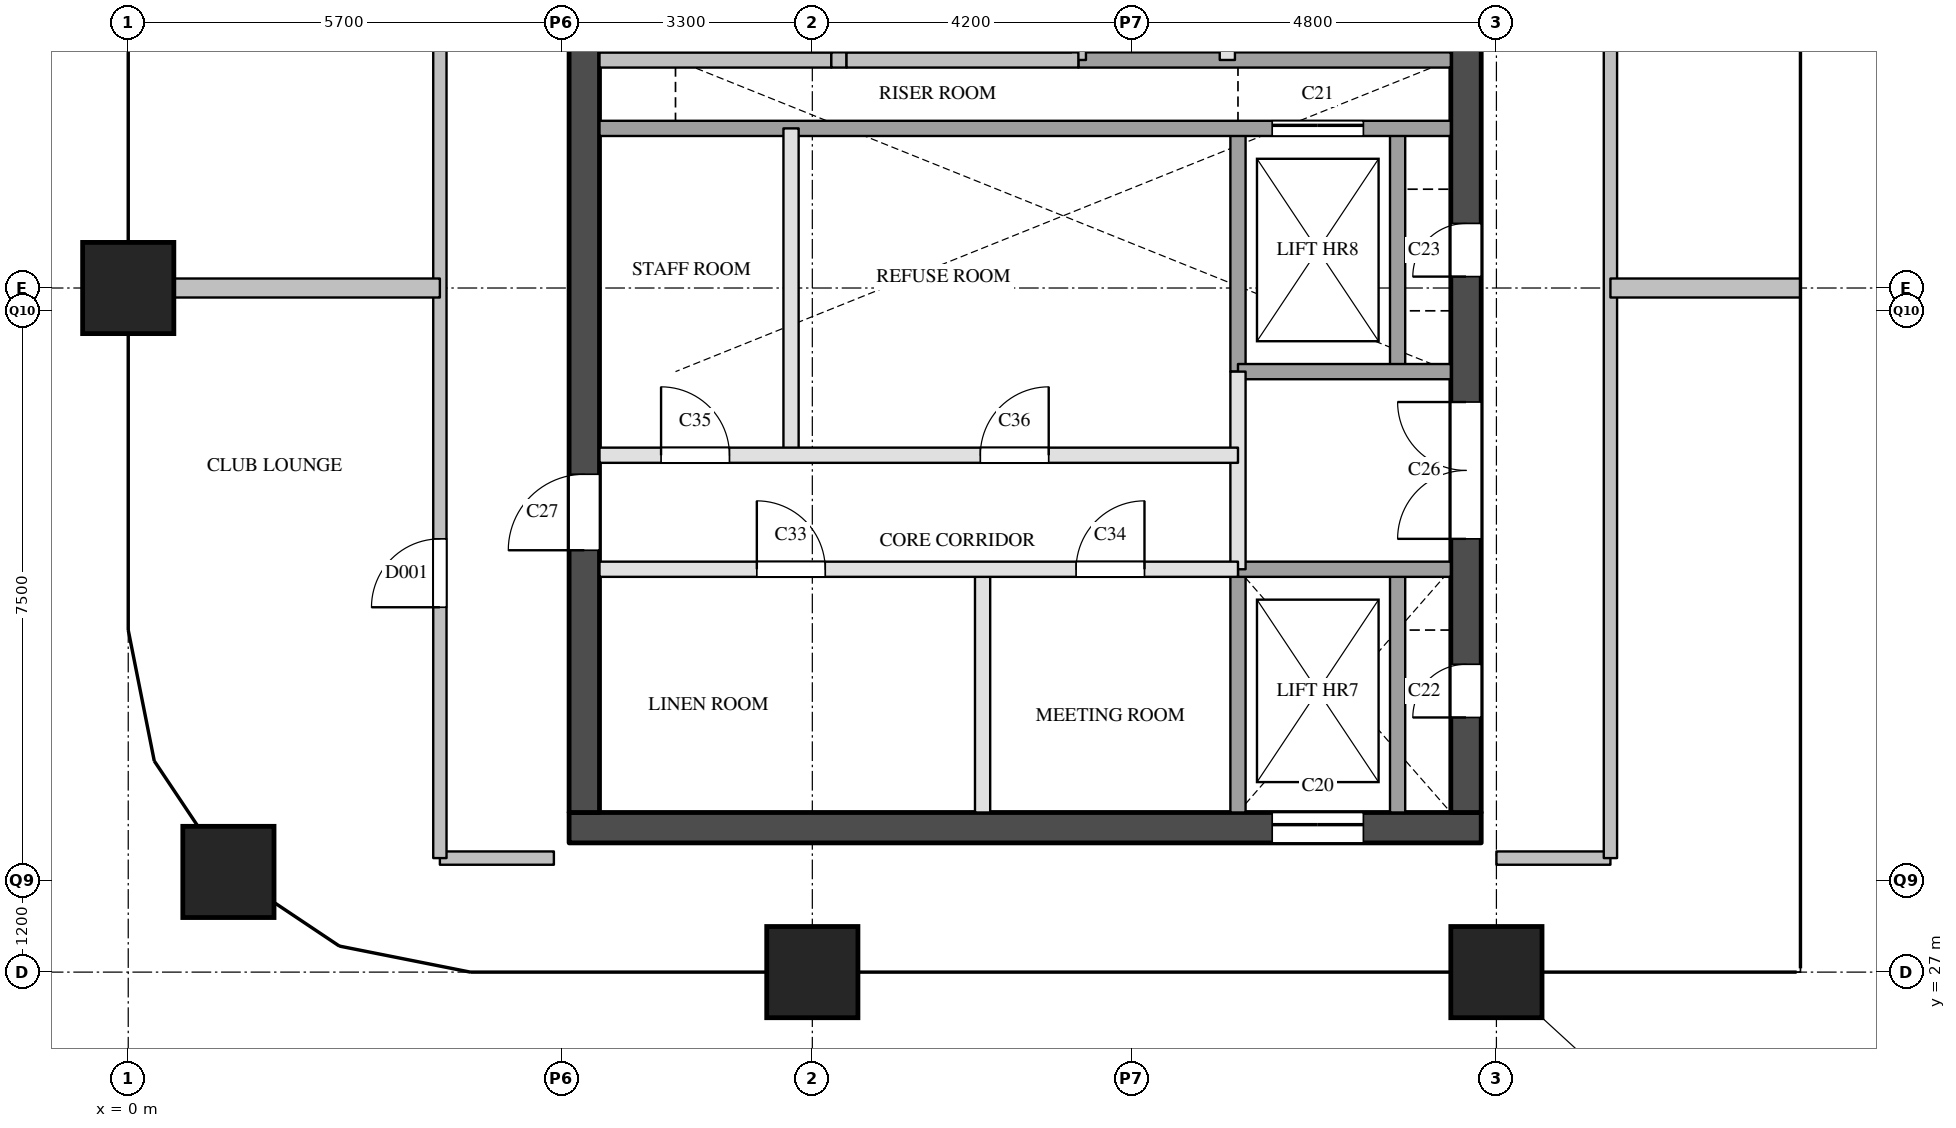
"""IFC4 building model, lengths in metres.
Left out: names, types, materials, properties, quantities, classifications, styles, units other than length and angle.
Written with IfcOpenShell. Run it as: python <this file> out.ifc"""

import sys

from ifc_helpers import new_model, si_unit, direction, frame, frame_2d, origin, origin_2d, place, context, subcontext, project, spatial, rectangle, extrude, element, fill, save


model = new_model("IFC4")
c1 = context("Model", 3, precision=1e-05, world=origin(), true_north=direction((0.0, 1.0)))
c2 = subcontext(c1, "Body", "Model", "MODEL_VIEW")
j1 = project(units=[si_unit("LENGTHUNIT", "METRE"), si_unit("PLANEANGLEUNIT", "RADIAN")], contexts=[c1])
p1 = place(None, origin())
s1 = spatial("IfcSite", under=j1, at=p1, CompositionType="ELEMENT")
p2 = place(p1, origin())
s2 = spatial("IfcBuilding", under=s1, at=p2, CompositionType="ELEMENT")
p3 = place(p2, frame((0.0, 0.0, 215.0)))
s3 = spatial("IfcBuildingStorey", under=s2, at=p3, CompositionType="ELEMENT", Elevation=215.0)
for number, where, z_axis, x_axis in (
    (1, (1.318, 28.318, 0.0), (0.0, 0.0, 1.0), (1.0, 0.0, 0.0)),
    (2, (0.0, 36.0, 0.0), (0.0, 0.0, 1.0), (1.0, 0.0, 0.0)),
    (3, (9.0, 27.0, 0.0), (0.0, 0.0, 1.0), (1.0, 0.0, 0.0)),
    (4, (18.0, 27.0, 0.0), (0.0, 0.0, 1.0), (1.0, 0.0, 0.0)),
):
    element("IfcColumn", number, at=place(p3, frame(where, z_axis=z_axis, x_axis=x_axis)), inside=s3, PredefinedType="COLUMN", context=c2, shape_type="SweptSolid", body=[
        extrude(rectangle(XDim=1.2, YDim=1.2, at=origin_2d()), origin(), (0.0, 0.0, 1.0), 3.9),
    ])
p4 = place(p3, frame((5.8, 28.9, 0.0), z_axis=(0.0, 0.0, 1.0), x_axis=(1.0, 0.0, 0.0)))
e5 = element("IfcWall", 5, at=p4, inside=s3, PredefinedType="SHEAR", context=c2, shape_type="SweptSolid", body=[
    extrude(rectangle(XDim=12.0, YDim=0.4, at=frame_2d((6.0, 0.0))), origin(), (0.0, 0.0, 1.0), 3.6),
])
p5 = place(p4, frame((9.25, 0.0, 0.0)))
e6 = element("IfcOpeningElement", 6, at=p5, cuts=e5, PredefinedType="OPENING", context=c2, shape_type="SweptSolid", body=[
    extrude(rectangle(XDim=1.2, YDim=2.1, at=frame_2d((0.6, 1.05))), frame((0.0, 0.21, 0.0), z_axis=(0.0, -1.0, 0.0), x_axis=(1.0, 0.0, 0.0)), (0.0, 0.0, 1.0), 0.42),
])
p6 = place(p3, frame((6.0, 29.1, 0.0), z_axis=(0.0, 0.0, 1.0), x_axis=(0.0, 1.0, 0.0)))
e7 = element("IfcWall", 7, at=p6, inside=s3, PredefinedType="SHEAR", context=c2, shape_type="SweptSolid", body=[
    extrude(rectangle(XDim=20.3, YDim=0.4, at=frame_2d((10.15, 0.0))), origin(), (0.0, 0.0, 1.0), 3.6),
])
p7 = place(p6, frame((3.45, 0.0, 0.0)))
e8 = element("IfcOpeningElement", 8, at=p7, cuts=e7, PredefinedType="OPENING", context=c2, shape_type="SweptSolid", body=[
    extrude(rectangle(XDim=1.0, YDim=2.1, at=frame_2d((0.5, 1.05))), frame((0.0, 0.21, 0.0), z_axis=(0.0, -1.0, 0.0), x_axis=(1.0, 0.0, 0.0)), (0.0, 0.0, 1.0), 0.42),
])
p8 = place(p6, frame((16.4, 0.0, 0.0)))
e9 = element("IfcOpeningElement", 9, at=p8, cuts=e7, PredefinedType="OPENING", context=c2, shape_type="SweptSolid", body=[
    extrude(rectangle(XDim=1.0, YDim=2.1, at=frame_2d((0.5, 1.05))), frame((0.0, 0.21, 0.0), z_axis=(0.0, -1.0, 0.0), x_axis=(1.0, 0.0, 0.0)), (0.0, 0.0, 1.0), 0.42),
])
p9 = place(p3, frame((17.6, 29.1, 0.0), z_axis=(0.0, 0.0, 1.0), x_axis=(0.0, 1.0, 0.0)))
e10 = element("IfcWall", 10, at=p9, inside=s3, PredefinedType="SHEAR", context=c2, shape_type="SweptSolid", body=[
    extrude(rectangle(XDim=20.3, YDim=0.4, at=frame_2d((10.15, 0.0))), origin(), (0.0, 0.0, 1.0), 3.6),
])
p10 = place(p9, frame((1.25, 0.0, 0.0)))
e11 = element("IfcOpeningElement", 11, at=p10, cuts=e10, PredefinedType="OPENING", context=c2, shape_type="SweptSolid", body=[
    extrude(rectangle(XDim=0.7, YDim=2.1, at=frame_2d((0.35, 1.05))), frame((0.0, 0.21, 0.0), z_axis=(0.0, -1.0, 0.0), x_axis=(1.0, 0.0, 0.0)), (0.0, 0.0, 1.0), 0.42),
])
p11 = place(p9, frame((7.05, 0.0, 0.0)))
e12 = element("IfcOpeningElement", 12, at=p11, cuts=e10, PredefinedType="OPENING", context=c2, shape_type="SweptSolid", body=[
    extrude(rectangle(XDim=0.7, YDim=2.1, at=frame_2d((0.35, 1.05))), frame((0.0, 0.21, 0.0), z_axis=(0.0, -1.0, 0.0), x_axis=(1.0, 0.0, 0.0)), (0.0, 0.0, 1.0), 0.42),
])
p12 = place(p9, frame((3.6, 0.0, 0.0)))
e13 = element("IfcOpeningElement", 13, at=p12, cuts=e10, PredefinedType="OPENING", context=c2, shape_type="SweptSolid", body=[
    extrude(rectangle(XDim=1.8, YDim=2.1, at=frame_2d((0.9, 1.05))), frame((0.0, 0.21, 0.0), z_axis=(0.0, -1.0, 0.0), x_axis=(1.0, 0.0, 0.0)), (0.0, 0.0, 1.0), 0.42),
])
p13 = place(p3, frame((8.72, 33.8, 0.0), z_axis=(0.0, 0.0, 1.0), x_axis=(0.0, 1.0, 0.0)))
e14 = element("IfcWall", 14, at=p13, inside=s3, PredefinedType="PARTITIONING", context=c2, shape_type="SweptSolid", body=[
    extrude(rectangle(XDim=4.3, YDim=0.2, at=frame_2d((2.15, 0.0))), origin(), (0.0, 0.0, 1.0), 3.6),
])
p14 = place(p3, frame((9.35, 39.0, 0.0), z_axis=(0.0, 0.0, 1.0), x_axis=(0.0, 1.0, 0.0)))
e15 = element("IfcWall", 15, at=p14, inside=s3, PredefinedType="SOLIDWALL", context=c2, shape_type="SweptSolid", body=[
    extrude(rectangle(XDim=1.9, YDim=0.2, at=frame_2d((0.95, 0.0))), origin(), (0.0, 0.0, 1.0), 3.6),
])
p15 = place(p3, frame((11.24, 29.1, 0.0), z_axis=(0.0, 0.0, 1.0), x_axis=(0.0, 1.0, 0.0)))
e16 = element("IfcWall", 16, at=p15, inside=s3, PredefinedType="PARTITIONING", context=c2, shape_type="SweptSolid", body=[
    extrude(rectangle(XDim=3.2, YDim=0.2, at=frame_2d((1.6, 0.0))), origin(), (0.0, 0.0, 1.0), 3.6),
])
p16 = place(p3, frame((12.5, 39.0, 0.0), z_axis=(0.0, 0.0, 1.0), x_axis=(0.0, 1.0, 0.0)))
e17 = element("IfcWall", 17, at=p16, inside=s3, PredefinedType="SOLIDWALL", context=c2, shape_type="SweptSolid", body=[
    extrude(rectangle(XDim=1.9, YDim=0.2, at=frame_2d((0.95, 0.0))), origin(), (0.0, 0.0, 1.0), 3.6),
])
p17 = place(p3, frame((14.46, 39.0, 0.0), z_axis=(0.0, 0.0, 1.0), x_axis=(0.0, 1.0, 0.0)))
e18 = element("IfcWall", 18, at=p17, inside=s3, PredefinedType="PARTITIONING", context=c2, shape_type="SweptSolid", body=[
    extrude(rectangle(XDim=6.2, YDim=0.2, at=frame_2d((3.1, 0.0))), origin(), (0.0, 0.0, 1.0), 3.6),
])
p18 = place(p3, frame((14.6, 32.3, 0.0), z_axis=(0.0, 0.0, 1.0), x_axis=(0.0, 1.0, 0.0)))
e19 = element("IfcWall", 19, at=p18, inside=s3, PredefinedType="PARTITIONING", context=c2, shape_type="SweptSolid", body=[
    extrude(rectangle(XDim=2.6, YDim=0.2, at=frame_2d((1.3, 0.0))), origin(), (0.0, 0.0, 1.0), 3.6),
])
p19 = place(p3, frame((14.6, 29.1, 0.0), z_axis=(0.0, 0.0, 1.0), x_axis=(0.0, 1.0, 0.0)))
e20 = element("IfcWall", 20, at=p19, inside=s3, PredefinedType="SOLIDWALL", context=c2, shape_type="SweptSolid", body=[
    extrude(rectangle(XDim=3.2, YDim=0.2, at=frame_2d((1.6, 0.0))), origin(), (0.0, 0.0, 1.0), 3.6),
])
p20 = place(p3, frame((14.6, 34.9, 0.0), z_axis=(0.0, 0.0, 1.0), x_axis=(0.0, 1.0, 0.0)))
e21 = element("IfcWall", 21, at=p20, inside=s3, PredefinedType="SOLIDWALL", context=c2, shape_type="SweptSolid", body=[
    extrude(rectangle(XDim=3.2, YDim=0.2, at=frame_2d((1.6, 0.0))), origin(), (0.0, 0.0, 1.0), 3.6),
])
p21 = place(p3, frame((16.7, 29.1, 0.0), z_axis=(0.0, 0.0, 1.0), x_axis=(0.0, 1.0, 0.0)))
e22 = element("IfcWall", 22, at=p21, inside=s3, PredefinedType="SOLIDWALL", context=c2, shape_type="SweptSolid", body=[
    extrude(rectangle(XDim=3.2, YDim=0.2, at=frame_2d((1.6, 0.0))), origin(), (0.0, 0.0, 1.0), 3.6),
])
p22 = place(p3, frame((16.7, 34.9, 0.0), z_axis=(0.0, 0.0, 1.0), x_axis=(0.0, 1.0, 0.0)))
e23 = element("IfcWall", 23, at=p22, inside=s3, PredefinedType="SOLIDWALL", context=c2, shape_type="SweptSolid", body=[
    extrude(rectangle(XDim=3.2, YDim=0.2, at=frame_2d((1.6, 0.0))), origin(), (0.0, 0.0, 1.0), 3.6),
])
p23 = place(p3, frame((6.2, 32.3, 0.0), z_axis=(0.0, 0.0, 1.0), x_axis=(1.0, 0.0, 0.0)))
e24 = element("IfcWall", 24, at=p23, inside=s3, PredefinedType="PARTITIONING", context=c2, shape_type="SweptSolid", body=[
    extrude(rectangle(XDim=8.4, YDim=0.2, at=frame_2d((4.2, 0.0))), origin(), (0.0, 0.0, 1.0), 3.6),
])
p24 = place(p23, frame((2.07, 0.0, 0.0)))
e25 = element("IfcOpeningElement", 25, at=p24, cuts=e24, PredefinedType="OPENING", context=c2, shape_type="SweptSolid", body=[
    extrude(rectangle(XDim=0.9, YDim=2.1, at=frame_2d((0.45, 1.05))), frame((0.0, 0.11, 0.0), z_axis=(0.0, -1.0, 0.0), x_axis=(1.0, 0.0, 0.0)), (0.0, 0.0, 1.0), 0.22),
])
p25 = place(p23, frame((6.27, 0.0, 0.0)))
e26 = element("IfcOpeningElement", 26, at=p25, cuts=e24, PredefinedType="OPENING", context=c2, shape_type="SweptSolid", body=[
    extrude(rectangle(XDim=0.9, YDim=2.1, at=frame_2d((0.45, 1.05))), frame((0.0, 0.11, 0.0), z_axis=(0.0, -1.0, 0.0), x_axis=(1.0, 0.0, 0.0)), (0.0, 0.0, 1.0), 0.22),
])
p26 = place(p3, frame((14.6, 32.3, 0.0), z_axis=(0.0, 0.0, 1.0), x_axis=(1.0, 0.0, 0.0)))
e27 = element("IfcWall", 27, at=p26, inside=s3, PredefinedType="SOLIDWALL", context=c2, shape_type="SweptSolid", body=[
    extrude(rectangle(XDim=2.8, YDim=0.2, at=frame_2d((1.4, 0.0))), origin(), (0.0, 0.0, 1.0), 3.6),
])
p27 = place(p3, frame((6.2, 33.8, 0.0), z_axis=(0.0, 0.0, 1.0), x_axis=(1.0, 0.0, 0.0)))
e28 = element("IfcWall", 28, at=p27, inside=s3, PredefinedType="PARTITIONING", context=c2, shape_type="SweptSolid", body=[
    extrude(rectangle(XDim=8.4, YDim=0.2, at=frame_2d((4.2, 0.0))), origin(), (0.0, 0.0, 1.0), 3.6),
])
p28 = place(p27, frame((0.81, 0.0, 0.0)))
e29 = element("IfcOpeningElement", 29, at=p28, cuts=e28, PredefinedType="OPENING", context=c2, shape_type="SweptSolid", body=[
    extrude(rectangle(XDim=0.9, YDim=2.1, at=frame_2d((0.45, 1.05))), frame((0.0, 0.11, 0.0), z_axis=(0.0, -1.0, 0.0), x_axis=(1.0, 0.0, 0.0)), (0.0, 0.0, 1.0), 0.22),
])
p29 = place(p27, frame((5.01, 0.0, 0.0)))
e30 = element("IfcOpeningElement", 30, at=p29, cuts=e28, PredefinedType="OPENING", context=c2, shape_type="SweptSolid", body=[
    extrude(rectangle(XDim=0.9, YDim=2.1, at=frame_2d((0.45, 1.05))), frame((0.0, 0.11, 0.0), z_axis=(0.0, -1.0, 0.0), x_axis=(1.0, 0.0, 0.0)), (0.0, 0.0, 1.0), 0.22),
])
p30 = place(p3, frame((14.6, 34.9, 0.0), z_axis=(0.0, 0.0, 1.0), x_axis=(1.0, 0.0, 0.0)))
e31 = element("IfcWall", 31, at=p30, inside=s3, PredefinedType="SOLIDWALL", context=c2, shape_type="SweptSolid", body=[
    extrude(rectangle(XDim=2.8, YDim=0.2, at=frame_2d((1.4, 0.0))), origin(), (0.0, 0.0, 1.0), 3.6),
])
p31 = place(p3, frame((6.2, 38.1, 0.0), z_axis=(0.0, 0.0, 1.0), x_axis=(1.0, 0.0, 0.0)))
e32 = element("IfcWall", 32, at=p31, inside=s3, PredefinedType="SOLIDWALL", context=c2, shape_type="SweptSolid", body=[
    extrude(rectangle(XDim=11.2, YDim=0.2, at=frame_2d((5.6, 0.0))), origin(), (0.0, 0.0, 1.0), 3.6),
])
p32 = place(p31, frame((8.85, 0.0, 0.0)))
e33 = element("IfcOpeningElement", 33, at=p32, cuts=e32, PredefinedType="OPENING", context=c2, shape_type="SweptSolid", body=[
    extrude(rectangle(XDim=1.2, YDim=2.1, at=frame_2d((0.6, 1.05))), frame((0.0, 0.11, 0.0), z_axis=(0.0, -1.0, 0.0), x_axis=(1.0, 0.0, 0.0)), (0.0, 0.0, 1.0), 0.22),
])
p33 = place(p3, frame((12.5, 39.0, 0.0), z_axis=(0.0, 0.0, 1.0), x_axis=(1.0, 0.0, 0.0)))
e34 = element("IfcWall", 34, at=p33, inside=s3, PredefinedType="SOLIDWALL", context=c2, shape_type="SweptSolid", body=[
    extrude(rectangle(XDim=4.9, YDim=0.2, at=frame_2d((2.45, 0.0))), origin(), (0.0, 0.0, 1.0), 3.6),
])
p34 = place(p3, frame((6.2, 39.0, 0.0), z_axis=(0.0, 0.0, 1.0), x_axis=(1.0, 0.0, 0.0)))
e35 = element("IfcWall", 35, at=p34, inside=s3, PredefinedType="SOLIDWALL", context=c2, shape_type="SweptSolid", body=[
    extrude(rectangle(XDim=3.05, YDim=0.2, at=frame_2d((1.525, 0.0))), origin(), (0.0, 0.0, 1.0), 3.6),
])
p35 = place(p3, frame((9.25, 39.0, 0.0), z_axis=(0.0, 0.0, 1.0), x_axis=(1.0, 0.0, 0.0)))
e36 = element("IfcWall", 36, at=p35, inside=s3, PredefinedType="SOLIDWALL", context=c2, shape_type="SweptSolid", body=[
    extrude(rectangle(XDim=0.2, YDim=0.2, at=frame_2d((0.1, 0.0))), origin(), (0.0, 0.0, 1.0), 3.6),
])
p36 = place(p3, frame((9.45, 39.0, 0.0), z_axis=(0.0, 0.0, 1.0), x_axis=(1.0, 0.0, 0.0)))
e37 = element("IfcWall", 37, at=p36, inside=s3, PredefinedType="SOLIDWALL", context=c2, shape_type="SweptSolid", body=[
    extrude(rectangle(XDim=3.05, YDim=0.2, at=frame_2d((1.525, 0.0))), origin(), (0.0, 0.0, 1.0), 3.6),
])
for number, where, z_axis, x_axis in (
    (38, (4.1, 28.5, 0.0), (0.0, 0.0, 1.0), (1.0, 0.0, 0.0)),
    (39, (18.0, 28.5, 0.0), (0.0, 0.0, 1.0), (1.0, 0.0, 0.0)),
):
    element("IfcWall", number, at=place(p3, frame(where, z_axis=z_axis, x_axis=x_axis)), inside=s3, PredefinedType="PARTITIONING", context=c2, shape_type="SweptSolid", body=[
        extrude(rectangle(XDim=1.5, YDim=0.175, at=frame_2d((0.75, 0.0))), origin(), (0.0, 0.0, 1.0), 3.6),
    ])
p37 = place(p3, frame((4.1, 28.5, 0.0), z_axis=(0.0, 0.0, 1.0), x_axis=(0.0, 1.0, 0.0)))
e40 = element("IfcWall", 40, at=p37, inside=s3, PredefinedType="PARTITIONING", context=c2, shape_type="SweptSolid", body=[
    extrude(rectangle(XDim=23.0, YDim=0.175, at=frame_2d((11.5, 0.0))), origin(), (0.0, 0.0, 1.0), 3.6),
])
p38 = place(p37, frame((3.3, 0.0, 0.0)))
e41 = element("IfcOpeningElement", 41, at=p38, cuts=e40, PredefinedType="OPENING", context=c2, shape_type="SweptSolid", body=[
    extrude(rectangle(XDim=0.9, YDim=2.1, at=frame_2d((0.45, 1.05))), frame((0.0, 0.097, 0.0), z_axis=(0.0, -1.0, 0.0), x_axis=(1.0, 0.0, 0.0)), (0.0, 0.0, 1.0), 0.195),
])
p39 = place(p37, frame((14.8, 0.0, 0.0)))
e42 = element("IfcOpeningElement", 42, at=p39, cuts=e40, PredefinedType="OPENING", context=c2, shape_type="SweptSolid", body=[
    extrude(rectangle(XDim=0.9, YDim=2.1, at=frame_2d((0.45, 1.05))), frame((0.0, 0.097, 0.0), z_axis=(0.0, -1.0, 0.0), x_axis=(1.0, 0.0, 0.0)), (0.0, 0.0, 1.0), 0.195),
])
p40 = place(p3, frame((19.5, 28.5, 0.0), z_axis=(0.0, 0.0, 1.0), x_axis=(0.0, 1.0, 0.0)))
e43 = element("IfcWall", 43, at=p40, inside=s3, PredefinedType="PARTITIONING", context=c2, shape_type="SweptSolid", body=[
    extrude(rectangle(XDim=15.75, YDim=0.175, at=frame_2d((7.875, 0.0))), origin(), (0.0, 0.0, 1.0), 3.6),
])
p41 = place(p40, frame((11.125, 0.0, 0.0)))
e44 = element("IfcOpeningElement", 44, at=p41, cuts=e43, PredefinedType="OPENING", context=c2, shape_type="SweptSolid", body=[
    extrude(rectangle(XDim=1.0, YDim=2.1, at=frame_2d((0.5, 1.05))), frame((0.0, 0.097, 0.0), z_axis=(0.0, -1.0, 0.0), x_axis=(1.0, 0.0, 0.0)), (0.0, 0.0, 1.0), 0.195),
])
p42 = place(p3, frame((0.0, 36.0, 0.0), z_axis=(0.0, 0.0, 1.0), x_axis=(1.0, 0.0, 0.0)))
e45 = element("IfcWall", 45, at=p42, inside=s3, PredefinedType="PARTITIONING", context=c2, shape_type="SweptSolid", body=[
    extrude(rectangle(XDim=4.1, YDim=0.25, at=frame_2d((2.05, 0.0))), origin(), (0.0, 0.0, 1.0), 3.6),
])
p43 = place(p3, frame((19.5, 36.0, 0.0), z_axis=(0.0, 0.0, 1.0), x_axis=(1.0, 0.0, 0.0)))
e46 = element("IfcWall", 46, at=p43, inside=s3, PredefinedType="PARTITIONING", context=c2, shape_type="SweptSolid", body=[
    extrude(rectangle(XDim=2.5, YDim=0.25, at=frame_2d((1.25, 0.0))), origin(), (0.0, 0.0, 1.0), 3.6),
])
p44 = place(p5, origin())
e47 = element("IfcDoor", 47, at=p44, inside=s3, OperationType="SLIDING_TO_LEFT", PredefinedType="DOOR", context=c2, shape_type="SweptSolid", body=[
    extrude(rectangle(XDim=1.2, YDim=2.1, at=frame_2d((0.6, 1.05))), frame((0.0, 0.025, 0.0), z_axis=(0.0, -1.0, 0.0), x_axis=(1.0, 0.0, 0.0)), (0.0, 0.0, 1.0), 0.05),
])
fill(e6, e47)
p45 = place(p32, origin())
e48 = element("IfcDoor", 48, at=p45, inside=s3, OperationType="SLIDING_TO_LEFT", PredefinedType="DOOR", context=c2, shape_type="SweptSolid", body=[
    extrude(rectangle(XDim=1.2, YDim=2.1, at=frame_2d((0.6, 1.05))), frame((0.0, 0.025, 0.0), z_axis=(0.0, -1.0, 0.0), x_axis=(1.0, 0.0, 0.0)), (0.0, 0.0, 1.0), 0.05),
])
fill(e33, e48)
p46 = place(p10, origin())
e49 = element("IfcDoor", 49, at=p46, inside=s3, OperationType="SINGLE_SWING_LEFT", PredefinedType="DOOR", context=c2, shape_type="SweptSolid", body=[
    extrude(rectangle(XDim=0.7, YDim=2.1, at=frame_2d((0.35, 1.05))), frame((0.0, 0.025, 0.0), z_axis=(0.0, -1.0, 0.0), x_axis=(1.0, 0.0, 0.0)), (0.0, 0.0, 1.0), 0.05),
])
fill(e11, e49)
p47 = place(p11, origin())
e50 = element("IfcDoor", 50, at=p47, inside=s3, OperationType="SINGLE_SWING_LEFT", PredefinedType="DOOR", context=c2, shape_type="SweptSolid", body=[
    extrude(rectangle(XDim=0.7, YDim=2.1, at=frame_2d((0.35, 1.05))), frame((0.0, 0.025, 0.0), z_axis=(0.0, -1.0, 0.0), x_axis=(1.0, 0.0, 0.0)), (0.0, 0.0, 1.0), 0.05),
])
fill(e12, e50)
p48 = place(p12, origin())
e51 = element("IfcDoor", 51, at=p48, inside=s3, OperationType="DOUBLE_DOOR_SINGLE_SWING", PredefinedType="DOOR", context=c2, shape_type="SweptSolid", body=[
    extrude(rectangle(XDim=1.8, YDim=2.1, at=frame_2d((0.9, 1.05))), frame((0.0, 0.025, 0.0), z_axis=(0.0, -1.0, 0.0), x_axis=(1.0, 0.0, 0.0)), (0.0, 0.0, 1.0), 0.05),
])
fill(e13, e51)
p49 = place(p7, origin())
e52 = element("IfcDoor", 52, at=p49, inside=s3, OperationType="SINGLE_SWING_LEFT", PredefinedType="DOOR", context=c2, shape_type="SweptSolid", body=[
    extrude(rectangle(XDim=1.0, YDim=2.1, at=frame_2d((0.5, 1.05))), frame((0.0, 0.025, 0.0), z_axis=(0.0, -1.0, 0.0), x_axis=(1.0, 0.0, 0.0)), (0.0, 0.0, 1.0), 0.05),
])
fill(e8, e52)
p50 = place(p24, origin())
e53 = element("IfcDoor", 53, at=p50, inside=s3, OperationType="SINGLE_SWING_LEFT", PredefinedType="DOOR", context=c2, shape_type="SweptSolid", body=[
    extrude(rectangle(XDim=0.9, YDim=2.1, at=frame_2d((0.45, 1.05))), frame((0.0, 0.025, 0.0), z_axis=(0.0, -1.0, 0.0), x_axis=(1.0, 0.0, 0.0)), (0.0, 0.0, 1.0), 0.05),
])
fill(e25, e53)
p51 = place(p25, origin())
e54 = element("IfcDoor", 54, at=p51, inside=s3, OperationType="SINGLE_SWING_RIGHT", PredefinedType="DOOR", context=c2, shape_type="SweptSolid", body=[
    extrude(rectangle(XDim=0.9, YDim=2.1, at=frame_2d((0.45, 1.05))), frame((0.0, 0.025, 0.0), z_axis=(0.0, -1.0, 0.0), x_axis=(1.0, 0.0, 0.0)), (0.0, 0.0, 1.0), 0.05),
])
fill(e26, e54)
p52 = place(p28, origin())
e55 = element("IfcDoor", 55, at=p52, inside=s3, OperationType="SINGLE_SWING_LEFT", PredefinedType="DOOR", context=c2, shape_type="SweptSolid", body=[
    extrude(rectangle(XDim=0.9, YDim=2.1, at=frame_2d((0.45, 1.05))), frame((0.0, 0.025, 0.0), z_axis=(0.0, -1.0, 0.0), x_axis=(1.0, 0.0, 0.0)), (0.0, 0.0, 1.0), 0.05),
])
fill(e29, e55)
p53 = place(p29, origin())
e56 = element("IfcDoor", 56, at=p53, inside=s3, OperationType="SINGLE_SWING_RIGHT", PredefinedType="DOOR", context=c2, shape_type="SweptSolid", body=[
    extrude(rectangle(XDim=0.9, YDim=2.1, at=frame_2d((0.45, 1.05))), frame((0.0, 0.025, 0.0), z_axis=(0.0, -1.0, 0.0), x_axis=(1.0, 0.0, 0.0)), (0.0, 0.0, 1.0), 0.05),
])
fill(e30, e56)
p54 = place(p38, origin())
e57 = element("IfcDoor", 57, at=p54, inside=s3, OperationType="SINGLE_SWING_LEFT", PredefinedType="DOOR", context=c2, shape_type="SweptSolid", body=[
    extrude(rectangle(XDim=0.9, YDim=2.1, at=frame_2d((0.45, 1.05))), frame((0.0, 0.025, 0.0), z_axis=(0.0, -1.0, 0.0), x_axis=(1.0, 0.0, 0.0)), (0.0, 0.0, 1.0), 0.05),
])
fill(e41, e57)
save(model, sys.argv[1])
